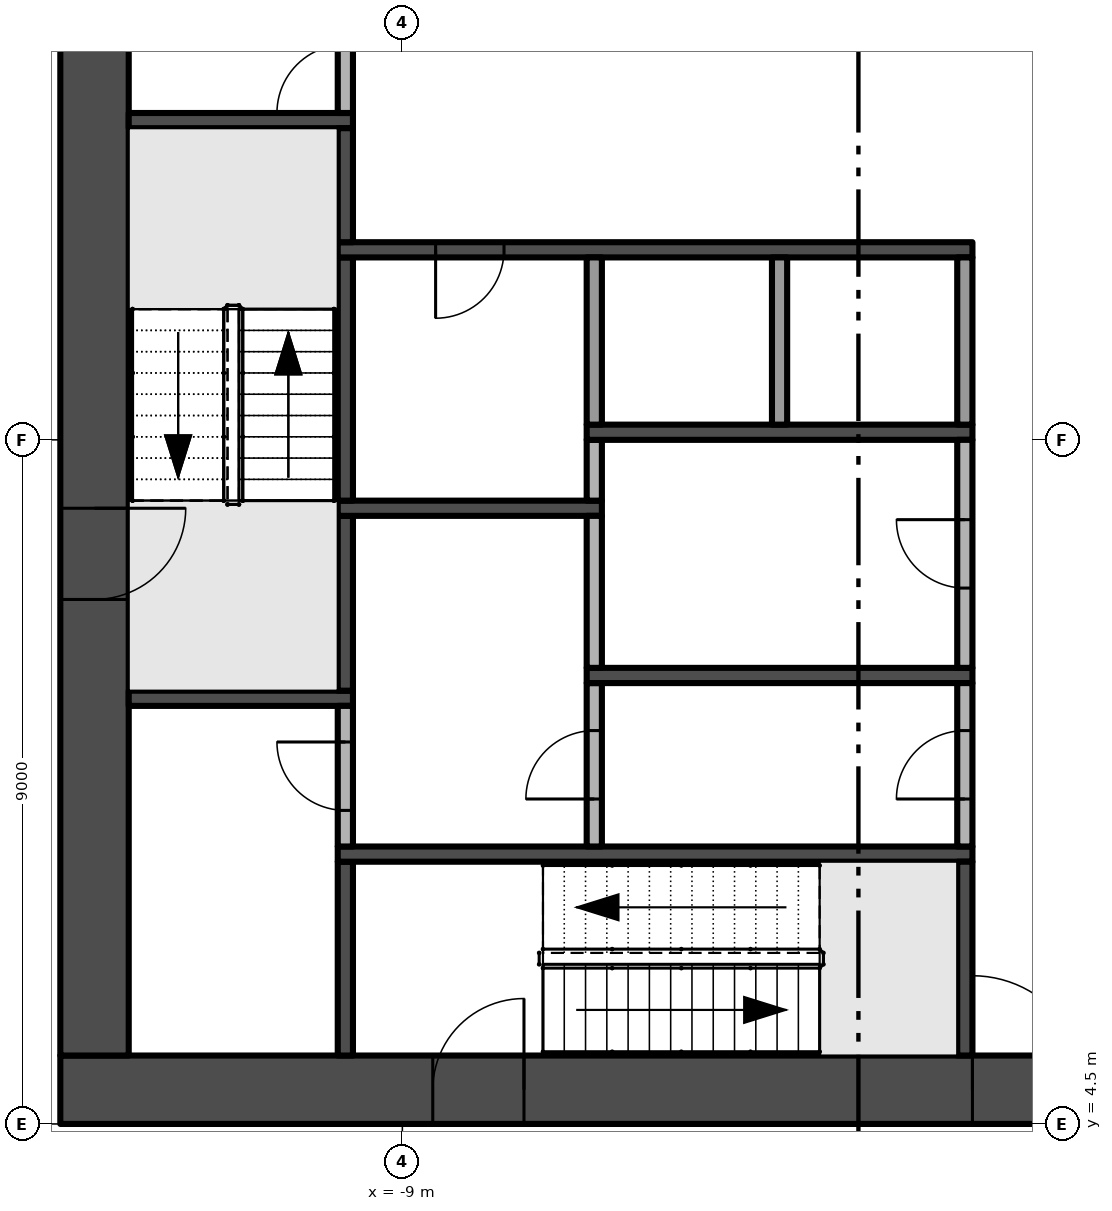
"""IFC4 building model, lengths in metres.
Left out: names, types, materials, properties, quantities, classifications, styles, units other than length and angle.
Written with IfcOpenShell. Run it as: python <this file> out.ifc"""

import sys

from ifc_helpers import new_model, si_unit, direction, frame, frame_2d, origin, place, context, subcontext, project, spatial, rectangle, extrude, element, fill, save


model = new_model("IFC4")
c1 = context("Model", 3, precision=1e-05, world=origin(), true_north=direction((0.0, 1.0)))
c2 = subcontext(c1, "Body", "Model", "MODEL_VIEW")
j1 = project(units=[si_unit("LENGTHUNIT", "METRE"), si_unit("PLANEANGLEUNIT", "RADIAN")], contexts=[c1])
p1 = place(None, origin())
s1 = spatial("IfcSite", under=j1, at=p1, CompositionType="ELEMENT")
p2 = place(p1, origin())
s2 = spatial("IfcBuilding", under=s1, at=p2, CompositionType="ELEMENT")
p3 = place(p2, frame((0.0, 0.0, 64.4)))
s3 = spatial("IfcBuildingStorey", under=s2, at=p3, CompositionType="ELEMENT", Elevation=64.4)
p4 = place(p3, frame((-13.5, 4.95, -0.3), z_axis=(0.0, 0.0, 1.0), x_axis=(1.0, 0.0, 0.0)))
e1 = element("IfcWall", 1, at=p4, inside=s3, PredefinedType="SHEAR", context=c2, shape_type="SweptSolid", body=[
    extrude(rectangle(XDim=27.0, YDim=0.9, at=frame_2d((13.5, 0.0))), origin(), (0.0, 0.0, 1.0), 5.0),
])
p5 = place(p4, frame((12.0, 0.0, 0.3)))
e2 = element("IfcOpeningElement", 2, at=p5, cuts=e1, PredefinedType="OPENING", context=c2, shape_type="SweptSolid", body=[
    extrude(rectangle(XDim=3.0, YDim=2.4, at=frame_2d((1.5, 1.2))), frame((0.0, 0.46, 0.0), z_axis=(0.0, -1.0, 0.0), x_axis=(1.0, 0.0, 0.0)), (0.0, 0.0, 1.0), 0.92),
])
p6 = place(p4, frame((4.9, 0.0, 0.3)))
e3 = element("IfcOpeningElement", 3, at=p6, cuts=e1, PredefinedType="OPENING", context=c2, shape_type="SweptSolid", body=[
    extrude(rectangle(XDim=1.2, YDim=2.2, at=frame_2d((0.6, 1.1))), frame((0.0, 0.46, 0.0), z_axis=(0.0, -1.0, 0.0), x_axis=(1.0, 0.0, 0.0)), (0.0, 0.0, 1.0), 0.92),
])
p7 = place(p4, frame((20.75, 0.0, 0.3)))
e4 = element("IfcOpeningElement", 4, at=p7, cuts=e1, PredefinedType="OPENING", context=c2, shape_type="SweptSolid", body=[
    extrude(rectangle(XDim=1.5, YDim=2.2, at=frame_2d((0.75, 1.1))), frame((0.0, 0.46, 0.0), z_axis=(0.0, -1.0, 0.0), x_axis=(1.0, 0.0, 0.0)), (0.0, 0.0, 1.0), 0.92),
])
p8 = place(p4, frame((17.4, 0.0, 0.3)))
e5 = element("IfcOpeningElement", 5, at=p8, cuts=e1, PredefinedType="OPENING", context=c2, shape_type="SweptSolid", body=[
    extrude(rectangle(XDim=1.2, YDim=2.2, at=frame_2d((0.6, 1.1))), frame((0.0, 0.46, 0.0), z_axis=(0.0, -1.0, 0.0), x_axis=(1.0, 0.0, 0.0)), (0.0, 0.0, 1.0), 0.92),
])
p9 = place(p3, frame((-13.05, 21.6, -0.3), z_axis=(0.0, 0.0, 1.0), x_axis=(0.0, -1.0, 0.0)))
e6 = element("IfcWall", 6, at=p9, inside=s3, PredefinedType="SHEAR", context=c2, shape_type="SweptSolid", body=[
    extrude(rectangle(XDim=16.2, YDim=0.9, at=frame_2d((8.1, 0.0))), origin(), (0.0, 0.0, 1.0), 5.0),
])
p10 = place(p9, frame((9.0, 0.0, 0.3)))
e7 = element("IfcOpeningElement", 7, at=p10, cuts=e6, PredefinedType="OPENING", context=c2, shape_type="SweptSolid", body=[
    extrude(rectangle(XDim=1.2, YDim=2.2, at=frame_2d((0.6, 1.1))), frame((0.0, 0.46, 0.0), z_axis=(0.0, -1.0, 0.0), x_axis=(1.0, 0.0, 0.0)), (0.0, 0.0, 1.0), 0.92),
])
for number, where, z_axis, x_axis in (
    (8, (-12.6, 10.1, 0.0), (0.0, 0.0, 1.0), (1.0, 0.0, 0.0)),
    (9, (-12.6, 17.7, 0.0), (0.0, 0.0, 1.0), (1.0, 0.0, 0.0)),
):
    element("IfcWall", number, at=place(p3, frame(where, z_axis=z_axis, x_axis=x_axis)), inside=s3, PredefinedType="SHEAR", context=c2, shape_type="SweptSolid", body=[
        extrude(rectangle(XDim=2.95, YDim=0.2, at=frame_2d((1.475, 0.0))), origin(), (0.0, 0.0, 1.0), 4.7),
    ])
p11 = place(p3, frame((-9.75, 5.4, 0.0), z_axis=(0.0, 0.0, 1.0), x_axis=(0.0, 1.0, 0.0)))
e10 = element("IfcWall", 10, at=p11, inside=s3, PredefinedType="SHEAR", context=c2, shape_type="SweptSolid", body=[
    extrude(rectangle(XDim=2.55, YDim=0.2, at=frame_2d((1.275, 0.0))), origin(), (0.0, 0.0, 1.0), 4.7),
])
p12 = place(p3, frame((-9.85, 8.05, 0.0), z_axis=(0.0, 0.0, 1.0), x_axis=(1.0, 0.0, 0.0)))
e11 = element("IfcWall", 11, at=p12, inside=s3, PredefinedType="SHEAR", context=c2, shape_type="SweptSolid", body=[
    extrude(rectangle(XDim=8.35, YDim=0.2, at=frame_2d((4.175, 0.0))), origin(), (0.0, 0.0, 1.0), 4.7),
])
p13 = place(p3, frame((-9.75, 8.15, 0.0), z_axis=(0.0, 0.0, 1.0), x_axis=(0.0, 1.0, 0.0)))
e12 = element("IfcWall", 12, at=p13, inside=s3, PredefinedType="PARTITIONING", context=c2, shape_type="SweptSolid", body=[
    extrude(rectangle(XDim=1.85, YDim=0.2, at=frame_2d((0.925, 0.0))), origin(), (0.0, 0.0, 1.0), 4.7),
])
p14 = place(p13, frame((0.475, 0.0, 0.0)))
e13 = element("IfcOpeningElement", 13, at=p14, cuts=e12, PredefinedType="OPENING", context=c2, shape_type="SweptSolid", body=[
    extrude(rectangle(XDim=0.9, YDim=2.1, at=frame_2d((0.45, 1.05))), frame((0.0, 0.11, 0.0), z_axis=(0.0, -1.0, 0.0), x_axis=(1.0, 0.0, 0.0)), (0.0, 0.0, 1.0), 0.22),
])
p15 = place(p3, frame((-9.75, 10.2, 0.0), z_axis=(0.0, 0.0, 1.0), x_axis=(0.0, 1.0, 0.0)))
e14 = element("IfcWall", 14, at=p15, inside=s3, PredefinedType="SHEAR", context=c2, shape_type="SweptSolid", body=[
    extrude(rectangle(XDim=2.3, YDim=0.2, at=frame_2d((1.15, 0.0))), origin(), (0.0, 0.0, 1.0), 4.7),
])
p16 = place(p3, frame((-9.85, 12.6, 0.0), z_axis=(0.0, 0.0, 1.0), x_axis=(1.0, 0.0, 0.0)))
e15 = element("IfcWall", 15, at=p16, inside=s3, PredefinedType="SHEAR", context=c2, shape_type="SweptSolid", body=[
    extrude(rectangle(XDim=3.475, YDim=0.2, at=frame_2d((1.738, 0.0))), origin(), (0.0, 0.0, 1.0), 4.7),
])
p17 = place(p3, frame((-9.75, 12.7, 0.0), z_axis=(0.0, 0.0, 1.0), x_axis=(0.0, 1.0, 0.0)))
e16 = element("IfcWall", 16, at=p17, inside=s3, PredefinedType="SHEAR", context=c2, shape_type="SweptSolid", body=[
    extrude(rectangle(XDim=3.2, YDim=0.2, at=frame_2d((1.6, 0.0))), origin(), (0.0, 0.0, 1.0), 4.7),
])
p18 = place(p3, frame((-1.5, 16.0, 0.0), z_axis=(0.0, 0.0, 1.0), x_axis=(-1.0, 0.0, 0.0)))
e17 = element("IfcWall", 17, at=p18, inside=s3, PredefinedType="SHEAR", context=c2, shape_type="SweptSolid", body=[
    extrude(rectangle(XDim=8.35, YDim=0.2, at=frame_2d((4.175, 0.0))), origin(), (0.0, 0.0, 1.0), 4.7),
])
p19 = place(p18, frame((6.162, 0.0, 0.0)))
e18 = element("IfcOpeningElement", 18, at=p19, cuts=e17, PredefinedType="OPENING", context=c2, shape_type="SweptSolid", body=[
    extrude(rectangle(XDim=0.9, YDim=2.1, at=frame_2d((0.45, 1.05))), frame((0.0, 0.11, 0.0), z_axis=(0.0, -1.0, 0.0), x_axis=(1.0, 0.0, 0.0)), (0.0, 0.0, 1.0), 0.22),
])
p20 = place(p3, frame((-9.75, 16.1, 0.0), z_axis=(0.0, 0.0, 1.0), x_axis=(0.0, 1.0, 0.0)))
e19 = element("IfcWall", 19, at=p20, inside=s3, PredefinedType="SHEAR", context=c2, shape_type="SweptSolid", body=[
    extrude(rectangle(XDim=1.5, YDim=0.2, at=frame_2d((0.75, 0.0))), origin(), (0.0, 0.0, 1.0), 4.7),
])
p21 = place(p3, frame((-9.75, 17.8, 0.0), z_axis=(0.0, 0.0, 1.0), x_axis=(0.0, 1.0, 0.0)))
e20 = element("IfcWall", 20, at=p21, inside=s3, PredefinedType="PARTITIONING", context=c2, shape_type="SweptSolid", body=[
    extrude(rectangle(XDim=1.4, YDim=0.2, at=frame_2d((0.7, 0.0))), origin(), (0.0, 0.0, 1.0), 4.7),
])
p22 = place(p21, origin())
e21 = element("IfcOpeningElement", 21, at=p22, cuts=e20, PredefinedType="OPENING", context=c2, shape_type="SweptSolid", body=[
    extrude(rectangle(XDim=0.9, YDim=2.1, at=frame_2d((0.45, 1.05))), frame((0.0, 0.11, 0.0), z_axis=(0.0, -1.0, 0.0), x_axis=(1.0, 0.0, 0.0)), (0.0, 0.0, 1.0), 0.22),
])
p23 = place(p3, frame((-6.475, 8.15, 0.0), z_axis=(0.0, 0.0, 1.0), x_axis=(0.0, 1.0, 0.0)))
e22 = element("IfcWall", 22, at=p23, inside=s3, PredefinedType="PARTITIONING", context=c2, shape_type="SweptSolid", body=[
    extrude(rectangle(XDim=2.15, YDim=0.2, at=frame_2d((1.075, 0.0))), origin(), (0.0, 0.0, 1.0), 4.7),
])
p24 = place(p23, frame((0.625, 0.0, 0.0)))
e23 = element("IfcOpeningElement", 23, at=p24, cuts=e22, PredefinedType="OPENING", context=c2, shape_type="SweptSolid", body=[
    extrude(rectangle(XDim=0.9, YDim=2.1, at=frame_2d((0.45, 1.05))), frame((0.0, 0.11, 0.0), z_axis=(0.0, -1.0, 0.0), x_axis=(1.0, 0.0, 0.0)), (0.0, 0.0, 1.0), 0.22),
])
p25 = place(p3, frame((-6.575, 10.4, 0.0), z_axis=(0.0, 0.0, 1.0), x_axis=(1.0, 0.0, 0.0)))
e24 = element("IfcWall", 24, at=p25, inside=s3, PredefinedType="SHEAR", context=c2, shape_type="SweptSolid", body=[
    extrude(rectangle(XDim=5.075, YDim=0.2, at=frame_2d((2.538, 0.0))), origin(), (0.0, 0.0, 1.0), 4.7),
])
p26 = place(p3, frame((-6.475, 10.5, 0.0), z_axis=(0.0, 0.0, 1.0), x_axis=(0.0, 1.0, 0.0)))
e25 = element("IfcWall", 25, at=p26, inside=s3, PredefinedType="PARTITIONING", context=c2, shape_type="SweptSolid", body=[
    extrude(rectangle(XDim=2.0, YDim=0.2, at=frame_2d((1.0, 0.0))), origin(), (0.0, 0.0, 1.0), 4.7),
])
p27 = place(p3, frame((-6.475, 12.7, 0.0), z_axis=(0.0, 0.0, 1.0), x_axis=(0.0, 1.0, 0.0)))
e26 = element("IfcWall", 26, at=p27, inside=s3, PredefinedType="PARTITIONING", context=c2, shape_type="SweptSolid", body=[
    extrude(rectangle(XDim=0.8, YDim=0.2, at=frame_2d((0.4, 0.0))), origin(), (0.0, 0.0, 1.0), 4.7),
])
p28 = place(p3, frame((-6.575, 13.6, 0.0), z_axis=(0.0, 0.0, 1.0), x_axis=(1.0, 0.0, 0.0)))
e27 = element("IfcWall", 27, at=p28, inside=s3, PredefinedType="SHEAR", context=c2, shape_type="SweptSolid", body=[
    extrude(rectangle(XDim=5.075, YDim=0.2, at=frame_2d((2.538, 0.0))), origin(), (0.0, 0.0, 1.0), 4.7),
])
for number, where, z_axis, x_axis in (
    (28, (-6.475, 13.7, 0.0), (0.0, 0.0, 1.0), (0.0, 1.0, 0.0)),
    (29, (-4.037, 13.7, 0.0), (0.0, 0.0, 1.0), (0.0, 1.0, 0.0)),
):
    element("IfcWall", number, at=place(p3, frame(where, z_axis=z_axis, x_axis=x_axis)), inside=s3, PredefinedType="PARTITIONING", context=c2, shape_type="SweptSolid", body=[
        extrude(rectangle(XDim=2.2, YDim=0.2, at=frame_2d((1.1, 0.0))), origin(), (0.0, 0.0, 1.0), 4.7),
    ])
p29 = place(p3, frame((-1.6, 5.4, 0.0), z_axis=(0.0, 0.0, 1.0), x_axis=(0.0, 1.0, 0.0)))
e30 = element("IfcWall", 30, at=p29, inside=s3, PredefinedType="SHEAR", context=c2, shape_type="SweptSolid", body=[
    extrude(rectangle(XDim=2.55, YDim=0.2, at=frame_2d((1.275, 0.0))), origin(), (0.0, 0.0, 1.0), 4.7),
])
p30 = place(p3, frame((-1.6, 8.15, 0.0), z_axis=(0.0, 0.0, 1.0), x_axis=(0.0, 1.0, 0.0)))
e31 = element("IfcWall", 31, at=p30, inside=s3, PredefinedType="PARTITIONING", context=c2, shape_type="SweptSolid", body=[
    extrude(rectangle(XDim=2.15, YDim=0.2, at=frame_2d((1.075, 0.0))), origin(), (0.0, 0.0, 1.0), 4.7),
])
p31 = place(p30, frame((0.625, 0.0, 0.0)))
e32 = element("IfcOpeningElement", 32, at=p31, cuts=e31, PredefinedType="OPENING", context=c2, shape_type="SweptSolid", body=[
    extrude(rectangle(XDim=0.9, YDim=2.1, at=frame_2d((0.45, 1.05))), frame((0.0, 0.11, 0.0), z_axis=(0.0, -1.0, 0.0), x_axis=(1.0, 0.0, 0.0)), (0.0, 0.0, 1.0), 0.22),
])
p32 = place(p3, frame((-1.6, 10.5, 0.0), z_axis=(0.0, 0.0, 1.0), x_axis=(0.0, 1.0, 0.0)))
e33 = element("IfcWall", 33, at=p32, inside=s3, PredefinedType="PARTITIONING", context=c2, shape_type="SweptSolid", body=[
    extrude(rectangle(XDim=3.0, YDim=0.2, at=frame_2d((1.5, 0.0))), origin(), (0.0, 0.0, 1.0), 4.7),
])
p33 = place(p32, frame((1.05, 0.0, 0.0)))
e34 = element("IfcOpeningElement", 34, at=p33, cuts=e33, PredefinedType="OPENING", context=c2, shape_type="SweptSolid", body=[
    extrude(rectangle(XDim=0.9, YDim=2.1, at=frame_2d((0.45, 1.05))), frame((0.0, 0.11, 0.0), z_axis=(0.0, -1.0, 0.0), x_axis=(1.0, 0.0, 0.0)), (0.0, 0.0, 1.0), 0.22),
])
p34 = place(p3, frame((-1.6, 13.7, 0.0), z_axis=(0.0, 0.0, 1.0), x_axis=(0.0, 1.0, 0.0)))
e35 = element("IfcWall", 35, at=p34, inside=s3, PredefinedType="PARTITIONING", context=c2, shape_type="SweptSolid", body=[
    extrude(rectangle(XDim=2.2, YDim=0.2, at=frame_2d((1.1, 0.0))), origin(), (0.0, 0.0, 1.0), 4.7),
])
p35 = place(p5, frame((3.0, 0.0, 0.0), z_axis=(0.0, 0.0, 1.0), x_axis=(-1.0, 0.0, 0.0)))
e36 = element("IfcDoor", 36, at=p35, inside=s3, OperationType="DOUBLE_DOOR_SINGLE_SWING", PredefinedType="DOOR", context=c2, shape_type="SweptSolid", body=[
    extrude(rectangle(XDim=3.0, YDim=2.4, at=frame_2d((1.5, 1.2))), frame((0.0, 0.025, 0.0), z_axis=(0.0, -1.0, 0.0), x_axis=(1.0, 0.0, 0.0)), (0.0, 0.0, 1.0), 0.05),
])
fill(e2, e36)
p36 = place(p10, frame((1.2, 0.0, 0.0), z_axis=(0.0, 0.0, 1.0), x_axis=(-1.0, 0.0, 0.0)))
e37 = element("IfcDoor", 37, at=p36, inside=s3, OperationType="SINGLE_SWING_RIGHT", PredefinedType="DOOR", context=c2, shape_type="SweptSolid", body=[
    extrude(rectangle(XDim=1.2, YDim=2.2, at=frame_2d((0.6, 1.1))), frame((0.0, 0.025, 0.0), z_axis=(0.0, -1.0, 0.0), x_axis=(1.0, 0.0, 0.0)), (0.0, 0.0, 1.0), 0.05),
])
fill(e7, e37)
p37 = place(p6, frame((1.2, 0.0, 0.0), z_axis=(0.0, 0.0, 1.0), x_axis=(-1.0, 0.0, 0.0)))
e38 = element("IfcDoor", 38, at=p37, inside=s3, OperationType="SINGLE_SWING_LEFT", PredefinedType="DOOR", context=c2, shape_type="SweptSolid", body=[
    extrude(rectangle(XDim=1.2, YDim=2.2, at=frame_2d((0.6, 1.1))), frame((0.0, 0.025, 0.0), z_axis=(0.0, -1.0, 0.0), x_axis=(1.0, 0.0, 0.0)), (0.0, 0.0, 1.0), 0.05),
])
fill(e3, e38)
p38 = place(p19, origin())
e39 = element("IfcDoor", 39, at=p38, inside=s3, OperationType="SINGLE_SWING_RIGHT", PredefinedType="DOOR", context=c2, shape_type="SweptSolid", body=[
    extrude(rectangle(XDim=0.9, YDim=2.1, at=frame_2d((0.45, 1.05))), frame((0.0, 0.025, 0.0), z_axis=(0.0, -1.0, 0.0), x_axis=(1.0, 0.0, 0.0)), (0.0, 0.0, 1.0), 0.05),
])
fill(e18, e39)
p39 = place(p31, origin())
e40 = element("IfcDoor", 40, at=p39, inside=s3, OperationType="SINGLE_SWING_LEFT", PredefinedType="DOOR", context=c2, shape_type="SweptSolid", body=[
    extrude(rectangle(XDim=0.9, YDim=2.1, at=frame_2d((0.45, 1.05))), frame((0.0, 0.025, 0.0), z_axis=(0.0, -1.0, 0.0), x_axis=(1.0, 0.0, 0.0)), (0.0, 0.0, 1.0), 0.05),
])
fill(e32, e40)
p40 = place(p33, origin())
e41 = element("IfcDoor", 41, at=p40, inside=s3, OperationType="SINGLE_SWING_RIGHT", PredefinedType="DOOR", context=c2, shape_type="SweptSolid", body=[
    extrude(rectangle(XDim=0.9, YDim=2.1, at=frame_2d((0.45, 1.05))), frame((0.0, 0.025, 0.0), z_axis=(0.0, -1.0, 0.0), x_axis=(1.0, 0.0, 0.0)), (0.0, 0.0, 1.0), 0.05),
])
fill(e34, e41)
p41 = place(p22, origin())
e42 = element("IfcDoor", 42, at=p41, inside=s3, OperationType="SINGLE_SWING_LEFT", PredefinedType="DOOR", context=c2, shape_type="SweptSolid", body=[
    extrude(rectangle(XDim=0.9, YDim=2.1, at=frame_2d((0.45, 1.05))), frame((0.0, 0.025, 0.0), z_axis=(0.0, -1.0, 0.0), x_axis=(1.0, 0.0, 0.0)), (0.0, 0.0, 1.0), 0.05),
])
fill(e21, e42)
p42 = place(p24, origin())
e43 = element("IfcDoor", 43, at=p42, inside=s3, OperationType="SINGLE_SWING_LEFT", PredefinedType="DOOR", context=c2, shape_type="SweptSolid", body=[
    extrude(rectangle(XDim=0.9, YDim=2.1, at=frame_2d((0.45, 1.05))), frame((0.0, 0.025, 0.0), z_axis=(0.0, -1.0, 0.0), x_axis=(1.0, 0.0, 0.0)), (0.0, 0.0, 1.0), 0.05),
])
fill(e23, e43)
p43 = place(p14, origin())
e44 = element("IfcDoor", 44, at=p43, inside=s3, OperationType="SINGLE_SWING_RIGHT", PredefinedType="DOOR", context=c2, shape_type="SweptSolid", body=[
    extrude(rectangle(XDim=0.9, YDim=2.1, at=frame_2d((0.45, 1.05))), frame((0.0, 0.025, 0.0), z_axis=(0.0, -1.0, 0.0), x_axis=(1.0, 0.0, 0.0)), (0.0, 0.0, 1.0), 0.05),
])
fill(e13, e44)
save(model, sys.argv[1])
